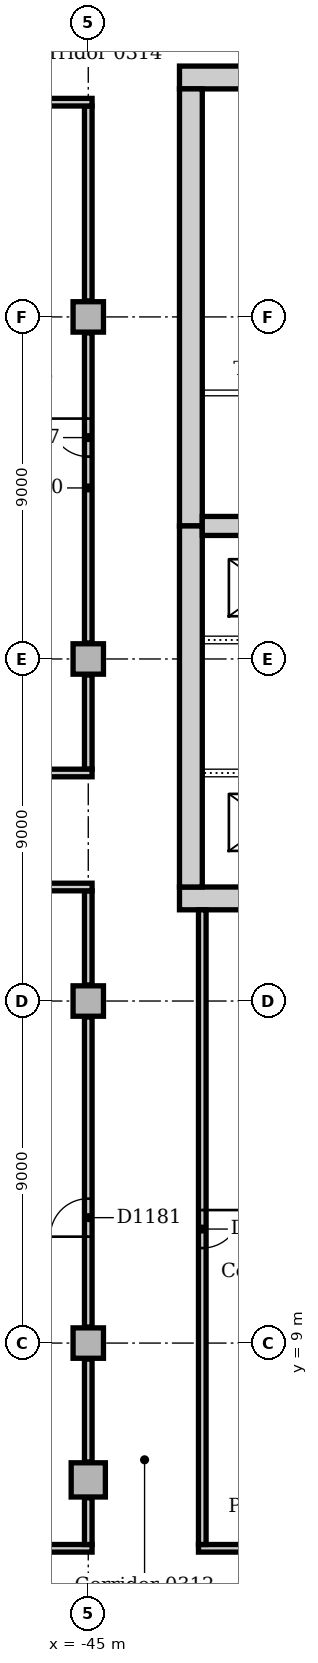
"""IFC4 building model, lengths in metres.
Left out: names, types, materials, properties, quantities, classifications, styles, units other than length and angle.
Written with IfcOpenShell. Run it as: python <this file> out.ifc"""

import sys

from ifc_helpers import new_model, si_unit, direction, frame, frame_2d, origin, origin_2d, place, context, subcontext, project, spatial, rectangle, extrude, element, fill, save


model = new_model("IFC4")
c1 = context("Model", 3, precision=1e-05, world=origin(), true_north=direction((0.0, 1.0)))
c2 = subcontext(c1, "Body", "Model", "MODEL_VIEW")
j1 = project(units=[si_unit("LENGTHUNIT", "METRE"), si_unit("PLANEANGLEUNIT", "RADIAN")], contexts=[c1])
p1 = place(None, origin())
s1 = spatial("IfcSite", under=j1, at=p1, CompositionType="ELEMENT")
p2 = place(p1, origin())
s2 = spatial("IfcBuilding", under=s1, at=p2, CompositionType="ELEMENT")
p3 = place(p2, frame((0.0, 0.0, 16.0)))
s3 = spatial("IfcBuildingStorey", under=s2, at=p3, CompositionType="ELEMENT", Elevation=16.0)
for number, where, z_axis, x_axis in (
    (1, (-42.6, 20.7, 0.0), (0.0, 0.0, 1.0), (1.0, 0.0, 0.0)),
    (2, (-30.9, 42.3, 0.0), (0.0, 0.0, 1.0), (-1.0, 0.0, 0.0)),
):
    element("IfcWall", number, at=place(p3, frame(where, z_axis=z_axis, x_axis=x_axis)), inside=s3, PredefinedType="SOLIDWALL", context=c2, shape_type="SweptSolid", body=[
        extrude(rectangle(XDim=11.7, YDim=0.6, at=frame_2d((5.85, 0.0))), origin(), (0.0, 0.0, 1.0), 5.0),
    ])
p4 = place(p3, frame((-42.3, 42.0, 0.0), z_axis=(0.0, 0.0, 1.0), x_axis=(0.0, -1.0, 0.0)))
e3 = element("IfcWall", 3, at=p4, inside=s3, PredefinedType="SOLIDWALL", context=c2, shape_type="SweptSolid", body=[
    extrude(rectangle(XDim=11.5, YDim=0.6, at=frame_2d((5.75, 0.0))), origin(), (0.0, 0.0, 1.0), 5.0),
])
p5 = place(p4, frame((8.85, 0.0, 0.0)))
e4 = element("IfcOpeningElement", 4, at=p5, cuts=e3, PredefinedType="OPENING", context=c2, shape_type="SweptSolid", body=[
    extrude(rectangle(XDim=1.8, YDim=2.1, at=frame_2d((0.9, 1.05))), frame((0.0, 0.31, 0.0), z_axis=(0.0, -1.0, 0.0), x_axis=(1.0, 0.0, 0.0)), (0.0, 0.0, 1.0), 0.62),
])
p6 = place(p3, frame((-42.3, 30.5, 0.0), z_axis=(0.0, 0.0, 1.0), x_axis=(0.0, -1.0, 0.0)))
e5 = element("IfcWall", 5, at=p6, inside=s3, PredefinedType="SOLIDWALL", context=c2, shape_type="SweptSolid", body=[
    extrude(rectangle(XDim=9.5, YDim=0.6, at=frame_2d((4.75, 0.0))), origin(), (0.0, 0.0, 1.0), 5.0),
])
p7 = place(p6, frame((3.85, 0.0, 0.0)))
e6 = element("IfcOpeningElement", 6, at=p7, cuts=e5, PredefinedType="OPENING", context=c2, shape_type="SweptSolid", body=[
    extrude(rectangle(XDim=1.8, YDim=2.1, at=frame_2d((0.9, 1.05))), frame((0.0, 0.31, 0.0), z_axis=(0.0, -1.0, 0.0), x_axis=(1.0, 0.0, 0.0)), (0.0, 0.0, 1.0), 0.62),
])
p8 = place(p3, frame((-42.0, 30.5, 0.0), z_axis=(0.0, 0.0, 1.0), x_axis=(1.0, 0.0, 0.0)))
e7 = element("IfcWall", 7, at=p8, inside=s3, PredefinedType="SOLIDWALL", context=c2, shape_type="SweptSolid", body=[
    extrude(rectangle(XDim=10.5, YDim=0.5, at=frame_2d((5.25, 0.0))), origin(), (0.0, 0.0, 1.0), 5.0),
])
p9 = place(p3, frame((-45.0, 5.4, 0.0), z_axis=(0.0, 0.0, 1.0), x_axis=(1.0, 0.0, 0.0)))
e8 = element("IfcColumn", 8, at=p9, inside=s3, PredefinedType="COLUMN", context=c2, shape_type="SweptSolid", body=[
    extrude(rectangle(XDim=0.9, YDim=0.9, at=origin_2d()), origin(), (0.0, 0.0, 1.0), 4.7),
])
for number, where, z_axis, x_axis in (
    (9, (-45.0, 9.0, 0.0), (0.0, 0.0, 1.0), (1.0, 0.0, 0.0)),
    (10, (-45.0, 18.0, 0.0), (0.0, 0.0, 1.0), (1.0, 0.0, 0.0)),
    (11, (-45.0, 27.0, 0.0), (0.0, 0.0, 1.0), (1.0, 0.0, 0.0)),
    (12, (-45.0, 36.0, 0.0), (0.0, 0.0, 1.0), (1.0, 0.0, 0.0)),
):
    element("IfcColumn", number, at=place(p3, frame(where, z_axis=z_axis, x_axis=x_axis)), inside=s3, PredefinedType="COLUMN", context=c2, shape_type="SweptSolid", body=[
        extrude(rectangle(XDim=0.8, YDim=0.8, at=origin_2d()), origin(), (0.0, 0.0, 1.0), 4.7),
    ])
p10 = place(p3, frame((-54.0, 3.6, 0.0), z_axis=(0.0, 0.0, 1.0), x_axis=(1.0, 0.0, 0.0)))
e13 = element("IfcWall", 13, at=p10, inside=s3, PredefinedType="PARTITIONING", context=c2, shape_type="SweptSolid", body=[
    extrude(rectangle(XDim=9.1, YDim=0.2, at=frame_2d((4.55, 0.0))), origin(), (0.0, 0.0, 1.0), 4.7),
])
p11 = place(p3, frame((-42.1, 3.6, 0.0), z_axis=(0.0, 0.0, 1.0), x_axis=(1.0, 0.0, 0.0)))
e14 = element("IfcWall", 14, at=p11, inside=s3, PredefinedType="PARTITIONING", context=c2, shape_type="SweptSolid", body=[
    extrude(rectangle(XDim=6.1, YDim=0.2, at=frame_2d((3.05, 0.0))), origin(), (0.0, 0.0, 1.0), 4.7),
])
p12 = place(p3, frame((-45.0, 3.7, 0.0), z_axis=(0.0, 0.0, 1.0), x_axis=(0.0, 1.0, 0.0)))
e15 = element("IfcWall", 15, at=p12, inside=s3, PredefinedType="PARTITIONING", context=c2, shape_type="SweptSolid", body=[
    extrude(rectangle(XDim=1.23, YDim=0.2, at=frame_2d((0.615, 0.0))), origin(), (0.0, 0.0, 1.0), 4.7),
])
p13 = place(p3, frame((-45.0, 5.87, 0.0), z_axis=(0.0, 0.0, 1.0), x_axis=(0.0, 1.0, 0.0)))
e16 = element("IfcWall", 16, at=p13, inside=s3, PredefinedType="PARTITIONING", context=c2, shape_type="SweptSolid", body=[
    extrude(rectangle(XDim=2.71, YDim=0.2, at=frame_2d((1.355, 0.0))), origin(), (0.0, 0.0, 1.0), 4.7),
])
p14 = place(p3, frame((-45.0, 9.42, 0.0), z_axis=(0.0, 0.0, 1.0), x_axis=(0.0, 1.0, 0.0)))
e17 = element("IfcWall", 17, at=p14, inside=s3, PredefinedType="PARTITIONING", context=c2, shape_type="SweptSolid", body=[
    extrude(rectangle(XDim=8.16, YDim=0.2, at=frame_2d((4.08, 0.0))), origin(), (0.0, 0.0, 1.0), 4.7),
])
p15 = place(p14, frame((2.38, 0.0, 0.0)))
e18 = element("IfcOpeningElement", 18, at=p15, cuts=e17, PredefinedType="OPENING", context=c2, shape_type="SweptSolid", body=[
    extrude(rectangle(XDim=1.0, YDim=2.1, at=frame_2d((0.5, 1.05))), frame((0.0, 0.11, 0.0), z_axis=(0.0, -1.0, 0.0), x_axis=(1.0, 0.0, 0.0)), (0.0, 0.0, 1.0), 0.22),
])
p16 = place(p3, frame((-45.0, 18.42, 0.0), z_axis=(0.0, 0.0, 1.0), x_axis=(0.0, 1.0, 0.0)))
e19 = element("IfcWall", 19, at=p16, inside=s3, PredefinedType="PARTITIONING", context=c2, shape_type="SweptSolid", body=[
    extrude(rectangle(XDim=2.48, YDim=0.2, at=frame_2d((1.24, 0.0))), origin(), (0.0, 0.0, 1.0), 4.7),
])
p17 = place(p3, frame((-42.0, 3.7, 0.0), z_axis=(0.0, 0.0, 1.0), x_axis=(0.0, 1.0, 0.0)))
e20 = element("IfcWall", 20, at=p17, inside=s3, PredefinedType="PARTITIONING", context=c2, shape_type="SweptSolid", body=[
    extrude(rectangle(XDim=16.7, YDim=0.2, at=frame_2d((8.35, 0.0))), origin(), (0.0, 0.0, 1.0), 4.7),
])
p18 = place(p17, frame((7.8, 0.0, 0.0)))
e21 = element("IfcOpeningElement", 21, at=p18, cuts=e20, PredefinedType="OPENING", context=c2, shape_type="SweptSolid", body=[
    extrude(rectangle(XDim=1.0, YDim=2.1, at=frame_2d((0.5, 1.05))), frame((0.0, 0.11, 0.0), z_axis=(0.0, -1.0, 0.0), x_axis=(1.0, 0.0, 0.0)), (0.0, 0.0, 1.0), 0.22),
])
p19 = place(p3, frame((-45.0, 24.1, 0.0), z_axis=(0.0, 0.0, 1.0), x_axis=(0.0, 1.0, 0.0)))
e22 = element("IfcWall", 22, at=p19, inside=s3, PredefinedType="PARTITIONING", context=c2, shape_type="SweptSolid", body=[
    extrude(rectangle(XDim=2.48, YDim=0.2, at=frame_2d((1.24, 0.0))), origin(), (0.0, 0.0, 1.0), 4.7),
])
p20 = place(p3, frame((-45.0, 27.42, 0.0), z_axis=(0.0, 0.0, 1.0), x_axis=(0.0, 1.0, 0.0)))
e23 = element("IfcWall", 23, at=p20, inside=s3, PredefinedType="PARTITIONING", context=c2, shape_type="SweptSolid", body=[
    extrude(rectangle(XDim=8.16, YDim=0.2, at=frame_2d((4.08, 0.0))), origin(), (0.0, 0.0, 1.0), 4.7),
])
p21 = place(p20, frame((4.905, 0.0, 0.0)))
e24 = element("IfcOpeningElement", 24, at=p21, cuts=e23, PredefinedType="OPENING", context=c2, shape_type="SweptSolid", body=[
    extrude(rectangle(XDim=1.0, YDim=2.1, at=frame_2d((0.5, 1.05))), frame((0.0, 0.11, 0.0), z_axis=(0.0, -1.0, 0.0), x_axis=(1.0, 0.0, 0.0)), (0.0, 0.0, 1.0), 0.22),
])
p22 = place(p3, frame((-45.0, 36.42, 0.0), z_axis=(0.0, 0.0, 1.0), x_axis=(0.0, 1.0, 0.0)))
e25 = element("IfcWall", 25, at=p22, inside=s3, PredefinedType="PARTITIONING", context=c2, shape_type="SweptSolid", body=[
    extrude(rectangle(XDim=5.13, YDim=0.2, at=frame_2d((2.565, 0.0))), origin(), (0.0, 0.0, 1.0), 4.7),
])
p23 = place(p3, frame((-54.0, 21.0, 0.0), z_axis=(0.0, 0.0, 1.0), x_axis=(1.0, 0.0, 0.0)))
e26 = element("IfcWall", 26, at=p23, inside=s3, PredefinedType="PARTITIONING", context=c2, shape_type="SweptSolid", body=[
    extrude(rectangle(XDim=9.1, YDim=0.2, at=frame_2d((4.55, 0.0))), origin(), (0.0, 0.0, 1.0), 4.7),
])
for number, where, z_axis, x_axis in (
    (27, (-52.5, 24.0, 0.0), (0.0, 0.0, 1.0), (1.0, 0.0, 0.0)),
    (28, (-52.5, 41.65, 0.0), (0.0, 0.0, 1.0), (1.0, 0.0, 0.0)),
):
    element("IfcWall", number, at=place(p3, frame(where, z_axis=z_axis, x_axis=x_axis)), inside=s3, PredefinedType="PARTITIONING", context=c2, shape_type="SweptSolid", body=[
        extrude(rectangle(XDim=7.6, YDim=0.2, at=frame_2d((3.8, 0.0))), origin(), (0.0, 0.0, 1.0), 4.7),
    ])
p24 = place(p3, frame((-38.6, 24.0, 0.0), z_axis=(0.0, 0.0, 1.0), x_axis=(-1.0, 0.0, 0.0)))
e29 = element("IfcWall", 29, at=p24, inside=s3, PredefinedType="SOLIDWALL", context=c2, shape_type="SweptSolid", body=[
    extrude(rectangle(XDim=3.4, YDim=0.2, at=frame_2d((1.7, 0.0))), origin(), (0.0, 0.0, 1.0), 5.0),
])
p25 = place(p24, frame((0.8, 0.0, 0.0)))
e30 = element("IfcOpeningElement", 30, at=p25, cuts=e29, PredefinedType="OPENING", context=c2, shape_type="SweptSolid", body=[
    extrude(rectangle(XDim=1.1, YDim=2.1, at=frame_2d((0.55, 1.05))), frame((0.0, 0.11, 0.0), z_axis=(0.0, -1.0, 0.0), x_axis=(1.0, 0.0, 0.0)), (0.0, 0.0, 1.0), 0.22),
])
p26 = place(p3, frame((-42.0, 27.5, 0.0), z_axis=(0.0, 0.0, 1.0), x_axis=(1.0, 0.0, 0.0)))
e31 = element("IfcWall", 31, at=p26, inside=s3, PredefinedType="SOLIDWALL", context=c2, shape_type="SweptSolid", body=[
    extrude(rectangle(XDim=3.4, YDim=0.2, at=frame_2d((1.7, 0.0))), origin(), (0.0, 0.0, 1.0), 5.0),
])
p27 = place(p26, frame((1.5, 0.0, 0.0)))
e32 = element("IfcOpeningElement", 32, at=p27, cuts=e31, PredefinedType="OPENING", context=c2, shape_type="SweptSolid", body=[
    extrude(rectangle(XDim=1.1, YDim=2.1, at=frame_2d((0.55, 1.05))), frame((0.0, 0.11, 0.0), z_axis=(0.0, -1.0, 0.0), x_axis=(1.0, 0.0, 0.0)), (0.0, 0.0, 1.0), 0.22),
])
p28 = place(p3, frame((-37.425, 34.0, 0.0), z_axis=(0.0, 0.0, 1.0), x_axis=(-1.0, 0.0, 0.0)))
e33 = element("IfcWall", 33, at=p28, inside=s3, PredefinedType="PARTITIONING", context=c2, shape_type="SweptSolid", body=[
    extrude(rectangle(XDim=4.575, YDim=0.15, at=frame_2d((2.288, 0.0))), origin(), (0.0, 0.0, 1.0), 4.7),
])
p29 = place(p28, frame((1.925, 0.0, 0.0)))
e34 = element("IfcOpeningElement", 34, at=p29, cuts=e33, PredefinedType="OPENING", context=c2, shape_type="SweptSolid", body=[
    extrude(rectangle(XDim=0.8, YDim=2.1, at=frame_2d((0.4, 1.05))), frame((0.0, 0.085, 0.0), z_axis=(0.0, -1.0, 0.0), x_axis=(1.0, 0.0, 0.0)), (0.0, 0.0, 1.0), 0.17),
])
p30 = place(p15, origin())
e35 = element("IfcDoor", 35, at=p30, inside=s3, OperationType="SINGLE_SWING_LEFT", PredefinedType="DOOR", context=c2, shape_type="SweptSolid", body=[
    extrude(rectangle(XDim=1.0, YDim=2.1, at=frame_2d((0.5, 1.05))), frame((0.0, 0.025, 0.0), z_axis=(0.0, -1.0, 0.0), x_axis=(1.0, 0.0, 0.0)), (0.0, 0.0, 1.0), 0.05),
])
fill(e18, e35)
p31 = place(p18, frame((1.0, 0.0, 0.0), z_axis=(0.0, 0.0, 1.0), x_axis=(-1.0, 0.0, 0.0)))
e36 = element("IfcDoor", 36, at=p31, inside=s3, OperationType="SINGLE_SWING_LEFT", PredefinedType="DOOR", context=c2, shape_type="SweptSolid", body=[
    extrude(rectangle(XDim=1.0, YDim=2.1, at=frame_2d((0.5, 1.05))), frame((0.0, 0.025, 0.0), z_axis=(0.0, -1.0, 0.0), x_axis=(1.0, 0.0, 0.0)), (0.0, 0.0, 1.0), 0.05),
])
fill(e21, e36)
p32 = place(p21, origin())
e37 = element("IfcDoor", 37, at=p32, inside=s3, OperationType="SINGLE_SWING_RIGHT", PredefinedType="DOOR", context=c2, shape_type="SweptSolid", body=[
    extrude(rectangle(XDim=1.0, YDim=2.1, at=frame_2d((0.5, 1.05))), frame((0.0, 0.025, 0.0), z_axis=(0.0, -1.0, 0.0), x_axis=(1.0, 0.0, 0.0)), (0.0, 0.0, 1.0), 0.05),
])
fill(e24, e37)
p33 = place(p7, origin())
e38 = element("IfcDoor", 38, at=p33, inside=s3, OperationType="DOUBLE_DOOR_SINGLE_SWING", PredefinedType="DOOR", context=c2, shape_type="SweptSolid", body=[
    extrude(rectangle(XDim=1.8, YDim=2.1, at=frame_2d((0.9, 1.05))), frame((0.0, 0.025, 0.0), z_axis=(0.0, -1.0, 0.0), x_axis=(1.0, 0.0, 0.0)), (0.0, 0.0, 1.0), 0.05),
])
fill(e6, e38)
p34 = place(p5, frame((1.8, 0.0, 0.0), z_axis=(0.0, 0.0, 1.0), x_axis=(-1.0, 0.0, 0.0)))
e39 = element("IfcDoor", 39, at=p34, inside=s3, OperationType="DOUBLE_DOOR_SINGLE_SWING", PredefinedType="DOOR", context=c2, shape_type="SweptSolid", body=[
    extrude(rectangle(XDim=1.8, YDim=2.1, at=frame_2d((0.9, 1.05))), frame((0.0, 0.025, 0.0), z_axis=(0.0, -1.0, 0.0), x_axis=(1.0, 0.0, 0.0)), (0.0, 0.0, 1.0), 0.05),
])
fill(e4, e39)
save(model, sys.argv[1])
